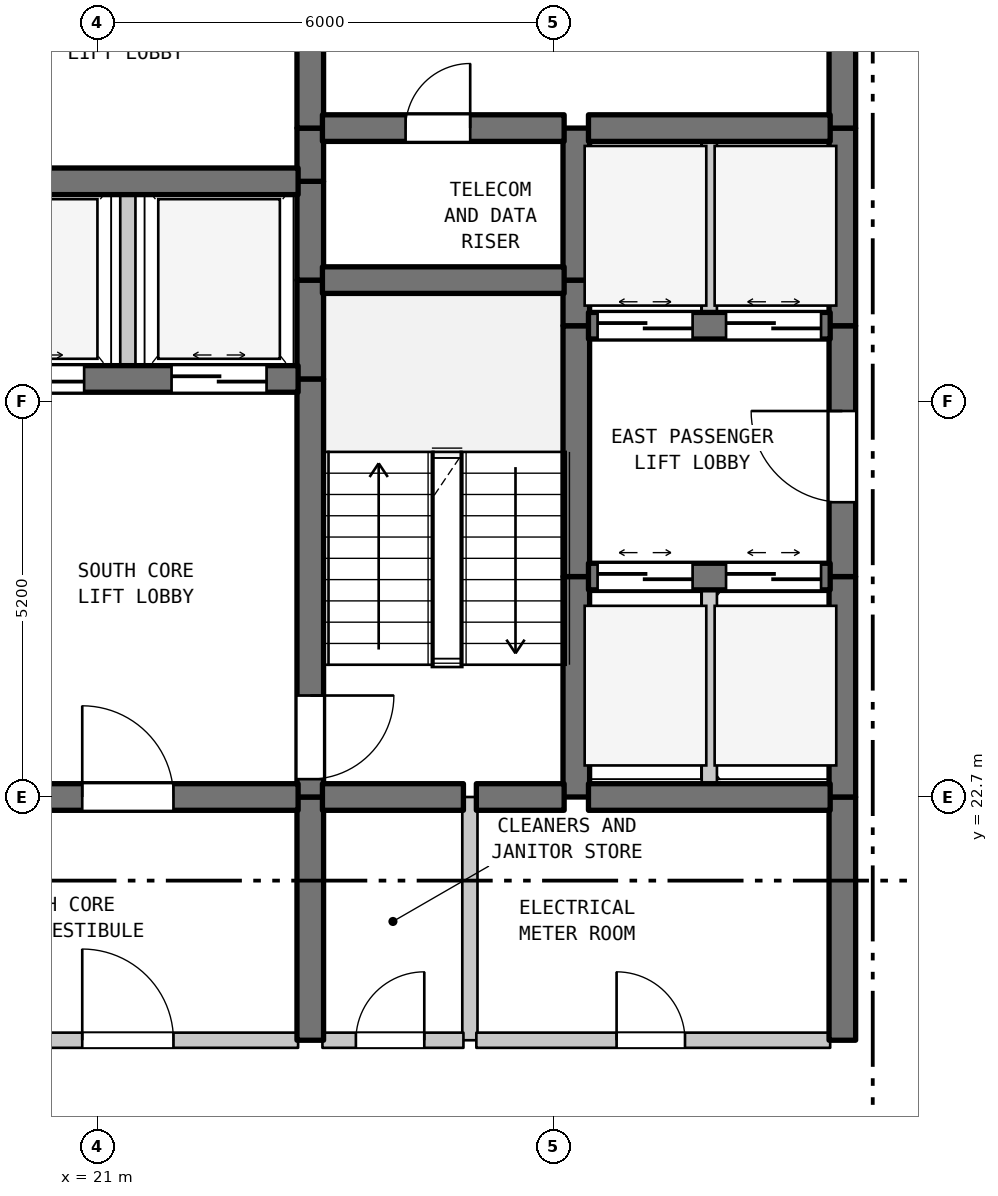
"""IFC4 building model, lengths in metres.
Left out: names, types, materials, properties, quantities, classifications, styles, units other than length and angle.
Written with IfcOpenShell. Run it as: python <this file> out.ifc"""

import sys

from ifc_helpers import new_model, si_unit, direction, frame, frame_2d, origin, place, context, subcontext, project, spatial, rectangle, extrude, element, fill, save


model = new_model("IFC4")
c1 = context("Model", 3, precision=1e-05, world=origin(), true_north=direction((0.0, 1.0)))
c2 = subcontext(c1, "Body", "Model", "MODEL_VIEW")
j1 = project(units=[si_unit("LENGTHUNIT", "METRE"), si_unit("PLANEANGLEUNIT", "RADIAN")], contexts=[c1])
p1 = place(None, origin())
s1 = spatial("IfcSite", under=j1, at=p1, CompositionType="ELEMENT")
p2 = place(p1, origin())
s2 = spatial("IfcBuilding", under=s1, at=p2, CompositionType="ELEMENT")
p3 = place(p2, frame((0.0, 0.0, 176.5)))
s3 = spatial("IfcBuildingStorey", under=s2, at=p3, CompositionType="ELEMENT", Elevation=176.5)
p4 = place(p3, frame((21.4, 28.2, 0.0), z_axis=(0.0, 0.0, 1.0), x_axis=(0.0, 1.0, 0.0)))
e1 = element("IfcWall", 1, at=p4, inside=s3, PredefinedType="STANDARD", context=c2, shape_type="SweptSolid", body=[
    extrude(rectangle(XDim=2.6, YDim=0.2, at=frame_2d((1.3, 0.0))), origin(), (0.0, 0.0, 1.0), 3.39),
])
p5 = place(p3, frame((23.8, 19.5, 0.0), z_axis=(0.0, 0.0, 1.0), x_axis=(0.0, 1.0, 0.0)))
e2 = element("IfcWall", 2, at=p5, inside=s3, PredefinedType="SHEAR", context=c2, shape_type="SweptSolid", body=[
    extrude(rectangle(XDim=3.2, YDim=0.35, at=frame_2d((1.6, 0.0))), origin(), (0.0, 0.0, 1.0), 3.39),
])
p6 = place(p3, frame((23.8, 22.7, 0.0), z_axis=(0.0, 0.0, 1.0), x_axis=(0.0, 1.0, 0.0)))
e3 = element("IfcWall", 3, at=p6, inside=s3, PredefinedType="SHEAR", context=c2, shape_type="SweptSolid", body=[
    extrude(rectangle(XDim=5.5, YDim=0.35, at=frame_2d((2.75, 0.0))), origin(), (0.0, 0.0, 1.0), 3.39),
])
p7 = place(p6, frame((0.235, 0.0, 0.0)))
e4 = element("IfcOpeningElement", 4, at=p7, cuts=e3, PredefinedType="OPENING", context=c2, shape_type="SweptSolid", body=[
    extrude(rectangle(XDim=1.1, YDim=2.15, at=frame_2d((0.55, 1.075))), frame((0.0, 0.185, 0.0), z_axis=(0.0, -1.0, 0.0), x_axis=(1.0, 0.0, 0.0)), (0.0, 0.0, 1.0), 0.37),
])
for number, where, z_axis, x_axis in (
    (5, (23.8, 28.2, 0.0), (0.0, 0.0, 1.0), (0.0, 1.0, 0.0)),
    (6, (23.8, 29.5, 0.0), (0.0, 0.0, 1.0), (0.0, 1.0, 0.0)),
):
    element("IfcWall", number, at=place(p3, frame(where, z_axis=z_axis, x_axis=x_axis)), inside=s3, PredefinedType="SHEAR", context=c2, shape_type="SweptSolid", body=[
        extrude(rectangle(XDim=1.3, YDim=0.35, at=frame_2d((0.65, 0.0))), origin(), (0.0, 0.0, 1.0), 3.39),
    ])
p8 = place(p3, frame((23.8, 30.8, 0.0), z_axis=(0.0, 0.0, 1.0), x_axis=(0.0, 1.0, 0.0)))
e7 = element("IfcWall", 7, at=p8, inside=s3, PredefinedType="SHEAR", context=c2, shape_type="SweptSolid", body=[
    extrude(rectangle(XDim=0.7, YDim=0.35, at=frame_2d((0.35, 0.0))), origin(), (0.0, 0.0, 1.0), 3.39),
])
p9 = place(p3, frame((23.8, 31.5, 0.0), z_axis=(0.0, 0.0, 1.0), x_axis=(0.0, 1.0, 0.0)))
e8 = element("IfcWall", 8, at=p9, inside=s3, PredefinedType="SHEAR", context=c2, shape_type="SweptSolid", body=[
    extrude(rectangle(XDim=3.5, YDim=0.35, at=frame_2d((1.75, 0.0))), origin(), (0.0, 0.0, 1.0), 3.39),
])
p10 = place(p9, frame((1.127, 0.0, 0.0)))
e9 = element("IfcOpeningElement", 9, at=p10, cuts=e8, PredefinedType="OPENING", context=c2, shape_type="SweptSolid", body=[
    extrude(rectangle(XDim=1.1, YDim=2.15, at=frame_2d((0.55, 1.075))), frame((0.0, 0.185, 0.0), z_axis=(0.0, -1.0, 0.0), x_axis=(1.0, 0.0, 0.0)), (0.0, 0.0, 1.0), 0.37),
])
p11 = place(p3, frame((25.9, 19.5, 0.0), z_axis=(0.0, 0.0, 1.0), x_axis=(0.0, 1.0, 0.0)))
e10 = element("IfcWall", 10, at=p11, inside=s3, PredefinedType="STANDARD", context=c2, shape_type="SweptSolid", body=[
    extrude(rectangle(XDim=3.2, YDim=0.2, at=frame_2d((1.6, 0.0))), origin(), (0.0, 0.0, 1.0), 3.39),
])
p12 = place(p3, frame((27.3, 22.7, 0.0), z_axis=(0.0, 0.0, 1.0), x_axis=(0.0, 1.0, 0.0)))
e11 = element("IfcWall", 11, at=p12, inside=s3, PredefinedType="SHEAR", context=c2, shape_type="SweptSolid", body=[
    extrude(rectangle(XDim=2.9, YDim=0.35, at=frame_2d((1.45, 0.0))), origin(), (0.0, 0.0, 1.0), 3.39),
])
p13 = place(p3, frame((27.3, 25.6, 0.0), z_axis=(0.0, 0.0, 1.0), x_axis=(0.0, 1.0, 0.0)))
e12 = element("IfcWall", 12, at=p13, inside=s3, PredefinedType="SHEAR", context=c2, shape_type="SweptSolid", body=[
    extrude(rectangle(XDim=3.3, YDim=0.35, at=frame_2d((1.65, 0.0))), origin(), (0.0, 0.0, 1.0), 3.39),
])
p14 = place(p3, frame((27.3, 28.9, 0.0), z_axis=(0.0, 0.0, 1.0), x_axis=(0.0, 1.0, 0.0)))
e13 = element("IfcWall", 13, at=p14, inside=s3, PredefinedType="SHEAR", context=c2, shape_type="SweptSolid", body=[
    extrude(rectangle(XDim=0.6, YDim=0.35, at=frame_2d((0.3, 0.0))), origin(), (0.0, 0.0, 1.0), 3.39),
])
p15 = place(p3, frame((27.3, 29.5, 0.0), z_axis=(0.0, 0.0, 1.0), x_axis=(0.0, 1.0, 0.0)))
e14 = element("IfcWall", 14, at=p15, inside=s3, PredefinedType="SHEAR", context=c2, shape_type="SweptSolid", body=[
    extrude(rectangle(XDim=2.0, YDim=0.35, at=frame_2d((1.0, 0.0))), origin(), (0.0, 0.0, 1.0), 3.39),
])
p16 = place(p3, frame((29.05, 22.7, 0.0), z_axis=(0.0, 0.0, 1.0), x_axis=(0.0, 1.0, 0.0)))
e15 = element("IfcWall", 15, at=p16, inside=s3, PredefinedType="STANDARD", context=c2, shape_type="SweptSolid", body=[
    extrude(rectangle(XDim=2.9, YDim=0.2, at=frame_2d((1.45, 0.0))), origin(), (0.0, 0.0, 1.0), 3.39),
])
p17 = place(p3, frame((29.05, 28.9, 0.0), z_axis=(0.0, 0.0, 1.0), x_axis=(0.0, 1.0, 0.0)))
e16 = element("IfcWall", 16, at=p17, inside=s3, PredefinedType="STANDARD", context=c2, shape_type="SweptSolid", body=[
    extrude(rectangle(XDim=2.6, YDim=0.2, at=frame_2d((1.3, 0.0))), origin(), (0.0, 0.0, 1.0), 3.39),
])
p18 = place(p3, frame((30.8, 19.5, 0.0), z_axis=(0.0, 0.0, 1.0), x_axis=(0.0, 1.0, 0.0)))
e17 = element("IfcWall", 17, at=p18, inside=s3, PredefinedType="SHEAR", context=c2, shape_type="SweptSolid", body=[
    extrude(rectangle(XDim=3.2, YDim=0.35, at=frame_2d((1.6, 0.0))), origin(), (0.0, 0.0, 1.0), 3.39),
])
p19 = place(p3, frame((30.8, 22.7, 0.0), z_axis=(0.0, 0.0, 1.0), x_axis=(0.0, 1.0, 0.0)))
e18 = element("IfcWall", 18, at=p19, inside=s3, PredefinedType="SHEAR", context=c2, shape_type="SweptSolid", body=[
    extrude(rectangle(XDim=2.9, YDim=0.35, at=frame_2d((1.45, 0.0))), origin(), (0.0, 0.0, 1.0), 3.39),
])
p20 = place(p3, frame((30.8, 25.6, 0.0), z_axis=(0.0, 0.0, 1.0), x_axis=(0.0, 1.0, 0.0)))
e19 = element("IfcWall", 19, at=p20, inside=s3, PredefinedType="SHEAR", context=c2, shape_type="SweptSolid", body=[
    extrude(rectangle(XDim=3.3, YDim=0.35, at=frame_2d((1.65, 0.0))), origin(), (0.0, 0.0, 1.0), 3.39),
])
p21 = place(p20, frame((0.978, 0.0, 0.0)))
e20 = element("IfcOpeningElement", 20, at=p21, cuts=e19, PredefinedType="OPENING", context=c2, shape_type="SweptSolid", body=[
    extrude(rectangle(XDim=1.2, YDim=2.2, at=frame_2d((0.6, 1.1))), frame((0.0, 0.185, 0.0), z_axis=(0.0, -1.0, 0.0), x_axis=(1.0, 0.0, 0.0)), (0.0, 0.0, 1.0), 0.37),
])
p22 = place(p3, frame((30.8, 28.9, 0.0), z_axis=(0.0, 0.0, 1.0), x_axis=(0.0, 1.0, 0.0)))
e21 = element("IfcWall", 21, at=p22, inside=s3, PredefinedType="SHEAR", context=c2, shape_type="SweptSolid", body=[
    extrude(rectangle(XDim=2.6, YDim=0.35, at=frame_2d((1.3, 0.0))), origin(), (0.0, 0.0, 1.0), 3.39),
])
p23 = place(p3, frame((30.8, 31.5, 0.0), z_axis=(0.0, 0.0, 1.0), x_axis=(0.0, 1.0, 0.0)))
e22 = element("IfcWall", 22, at=p23, inside=s3, PredefinedType="SHEAR", context=c2, shape_type="SweptSolid", body=[
    extrude(rectangle(XDim=3.5, YDim=0.35, at=frame_2d((1.75, 0.0))), origin(), (0.0, 0.0, 1.0), 3.39),
])
p24 = place(p23, frame((1.15, 0.0, 0.0)))
e23 = element("IfcOpeningElement", 23, at=p24, cuts=e22, PredefinedType="OPENING", context=c2, shape_type="SweptSolid", body=[
    extrude(rectangle(XDim=1.2, YDim=2.2, at=frame_2d((0.6, 1.1))), frame((0.0, 0.185, 0.0), z_axis=(0.0, -1.0, 0.0), x_axis=(1.0, 0.0, 0.0)), (0.0, 0.0, 1.0), 0.37),
])
p25 = place(p3, frame((19.16, 19.5, 0.0), z_axis=(0.0, 0.0, 1.0), x_axis=(1.0, 0.0, 0.0)))
e24 = element("IfcWall", 24, at=p25, inside=s3, PredefinedType="STANDARD", context=c2, shape_type="SweptSolid", body=[
    extrude(rectangle(XDim=4.48, YDim=0.2, at=frame_2d((2.24, 0.0))), origin(), (0.0, 0.0, 1.0), 3.39),
])
p26 = place(p25, frame((1.64, 0.0, 0.0)))
e25 = element("IfcOpeningElement", 25, at=p26, cuts=e24, PredefinedType="OPENING", context=c2, shape_type="SweptSolid", body=[
    extrude(rectangle(XDim=1.2, YDim=2.2, at=frame_2d((0.6, 1.1))), frame((0.0, 0.11, 0.0), z_axis=(0.0, -1.0, 0.0), x_axis=(1.0, 0.0, 0.0)), (0.0, 0.0, 1.0), 0.22),
])
p27 = place(p3, frame((23.96, 19.5, 0.0), z_axis=(0.0, 0.0, 1.0), x_axis=(1.0, 0.0, 0.0)))
e26 = element("IfcWall", 26, at=p27, inside=s3, PredefinedType="STANDARD", context=c2, shape_type="SweptSolid", body=[
    extrude(rectangle(XDim=1.855, YDim=0.2, at=frame_2d((0.927, 0.0))), origin(), (0.0, 0.0, 1.0), 3.39),
])
p28 = place(p27, frame((0.44, 0.0, 0.0)))
e27 = element("IfcOpeningElement", 27, at=p28, cuts=e26, PredefinedType="OPENING", context=c2, shape_type="SweptSolid", body=[
    extrude(rectangle(XDim=0.9, YDim=2.15, at=frame_2d((0.45, 1.075))), frame((0.0, 0.11, 0.0), z_axis=(0.0, -1.0, 0.0), x_axis=(1.0, 0.0, 0.0)), (0.0, 0.0, 1.0), 0.22),
])
p29 = place(p3, frame((25.985, 19.5, 0.0), z_axis=(0.0, 0.0, 1.0), x_axis=(1.0, 0.0, 0.0)))
e28 = element("IfcWall", 28, at=p29, inside=s3, PredefinedType="STANDARD", context=c2, shape_type="SweptSolid", body=[
    extrude(rectangle(XDim=4.655, YDim=0.2, at=frame_2d((2.327, 0.0))), origin(), (0.0, 0.0, 1.0), 3.39),
])
p30 = place(p29, frame((1.845, 0.0, 0.0)))
e29 = element("IfcOpeningElement", 29, at=p30, cuts=e28, PredefinedType="OPENING", context=c2, shape_type="SweptSolid", body=[
    extrude(rectangle(XDim=0.9, YDim=2.15, at=frame_2d((0.45, 1.075))), frame((0.0, 0.11, 0.0), z_axis=(0.0, -1.0, 0.0), x_axis=(1.0, 0.0, 0.0)), (0.0, 0.0, 1.0), 0.22),
])
p31 = place(p3, frame((19.16, 22.7, 0.0), z_axis=(0.0, 0.0, 1.0), x_axis=(1.0, 0.0, 0.0)))
e30 = element("IfcWall", 30, at=p31, inside=s3, PredefinedType="SHEAR", context=c2, shape_type="SweptSolid", body=[
    extrude(rectangle(XDim=4.48, YDim=0.35, at=frame_2d((2.24, 0.0))), origin(), (0.0, 0.0, 1.0), 3.39),
])
p32 = place(p31, frame((1.64, 0.0, 0.0)))
e31 = element("IfcOpeningElement", 31, at=p32, cuts=e30, PredefinedType="OPENING", context=c2, shape_type="SweptSolid", body=[
    extrude(rectangle(XDim=1.2, YDim=2.2, at=frame_2d((0.6, 1.1))), frame((0.0, 0.185, 0.0), z_axis=(0.0, -1.0, 0.0), x_axis=(1.0, 0.0, 0.0)), (0.0, 0.0, 1.0), 0.37),
])
p33 = place(p3, frame((23.96, 22.7, 0.0), z_axis=(0.0, 0.0, 1.0), x_axis=(1.0, 0.0, 0.0)))
e32 = element("IfcWall", 32, at=p33, inside=s3, PredefinedType="SHEAR", context=c2, shape_type="SweptSolid", body=[
    extrude(rectangle(XDim=1.855, YDim=0.35, at=frame_2d((0.927, 0.0))), origin(), (0.0, 0.0, 1.0), 3.39),
])
p34 = place(p3, frame((25.985, 22.7, 0.0), z_axis=(0.0, 0.0, 1.0), x_axis=(1.0, 0.0, 0.0)))
e33 = element("IfcWall", 33, at=p34, inside=s3, PredefinedType="SHEAR", context=c2, shape_type="SweptSolid", body=[
    extrude(rectangle(XDim=1.155, YDim=0.35, at=frame_2d((0.577, 0.0))), origin(), (0.0, 0.0, 1.0), 3.39),
])
p35 = place(p3, frame((27.46, 22.7, 0.0), z_axis=(0.0, 0.0, 1.0), x_axis=(1.0, 0.0, 0.0)))
e34 = element("IfcWall", 34, at=p35, inside=s3, PredefinedType="SHEAR", context=c2, shape_type="SweptSolid", body=[
    extrude(rectangle(XDim=3.18, YDim=0.35, at=frame_2d((1.59, 0.0))), origin(), (0.0, 0.0, 1.0), 3.39),
])
p36 = place(p3, frame((27.46, 25.6, 0.0), z_axis=(0.0, 0.0, 1.0), x_axis=(1.0, 0.0, 0.0)))
e35 = element("IfcWall", 35, at=p36, inside=s3, PredefinedType="SHEAR", context=c2, shape_type="SweptSolid", body=[
    extrude(rectangle(XDim=3.18, YDim=0.35, at=frame_2d((1.59, 0.0))), origin(), (0.0, 0.0, 1.0), 3.39),
])
p37 = place(p36, frame((0.12, 0.0, 0.0)))
e36 = element("IfcOpeningElement", 36, at=p37, cuts=e35, PredefinedType="OPENING", context=c2, shape_type="SweptSolid", body=[
    extrude(rectangle(XDim=1.25, YDim=2.2, at=frame_2d((0.625, 1.1))), frame((0.0, 0.185, 0.0), z_axis=(0.0, -1.0, 0.0), x_axis=(1.0, 0.0, 0.0)), (0.0, 0.0, 1.0), 0.37),
])
p38 = place(p36, frame((1.81, 0.0, 0.0)))
e37 = element("IfcOpeningElement", 37, at=p38, cuts=e35, PredefinedType="OPENING", context=c2, shape_type="SweptSolid", body=[
    extrude(rectangle(XDim=1.25, YDim=2.2, at=frame_2d((0.625, 1.1))), frame((0.0, 0.185, 0.0), z_axis=(0.0, -1.0, 0.0), x_axis=(1.0, 0.0, 0.0)), (0.0, 0.0, 1.0), 0.37),
])
p39 = place(p3, frame((19.16, 28.2, 0.0), z_axis=(0.0, 0.0, 1.0), x_axis=(1.0, 0.0, 0.0)))
e38 = element("IfcWall", 38, at=p39, inside=s3, PredefinedType="SHEAR", context=c2, shape_type="SweptSolid", body=[
    extrude(rectangle(XDim=4.48, YDim=0.35, at=frame_2d((2.24, 0.0))), origin(), (0.0, 0.0, 1.0), 3.39),
])
p40 = place(p39, frame((0.415, 0.0, 0.0)))
e39 = element("IfcOpeningElement", 39, at=p40, cuts=e38, PredefinedType="OPENING", context=c2, shape_type="SweptSolid", body=[
    extrude(rectangle(XDim=1.25, YDim=2.2, at=frame_2d((0.625, 1.1))), frame((0.0, 0.185, 0.0), z_axis=(0.0, -1.0, 0.0), x_axis=(1.0, 0.0, 0.0)), (0.0, 0.0, 1.0), 0.37),
])
p41 = place(p39, frame((2.815, 0.0, 0.0)))
e40 = element("IfcOpeningElement", 40, at=p41, cuts=e38, PredefinedType="OPENING", context=c2, shape_type="SweptSolid", body=[
    extrude(rectangle(XDim=1.25, YDim=2.2, at=frame_2d((0.625, 1.1))), frame((0.0, 0.185, 0.0), z_axis=(0.0, -1.0, 0.0), x_axis=(1.0, 0.0, 0.0)), (0.0, 0.0, 1.0), 0.37),
])
p42 = place(p3, frame((27.46, 28.9, 0.0), z_axis=(0.0, 0.0, 1.0), x_axis=(1.0, 0.0, 0.0)))
e41 = element("IfcWall", 41, at=p42, inside=s3, PredefinedType="SHEAR", context=c2, shape_type="SweptSolid", body=[
    extrude(rectangle(XDim=3.18, YDim=0.35, at=frame_2d((1.59, 0.0))), origin(), (0.0, 0.0, 1.0), 3.39),
])
p43 = place(p42, frame((0.12, 0.0, 0.0)))
e42 = element("IfcOpeningElement", 42, at=p43, cuts=e41, PredefinedType="OPENING", context=c2, shape_type="SweptSolid", body=[
    extrude(rectangle(XDim=1.25, YDim=2.2, at=frame_2d((0.625, 1.1))), frame((0.0, 0.185, 0.0), z_axis=(0.0, -1.0, 0.0), x_axis=(1.0, 0.0, 0.0)), (0.0, 0.0, 1.0), 0.37),
])
p44 = place(p42, frame((1.81, 0.0, 0.0)))
e43 = element("IfcOpeningElement", 43, at=p44, cuts=e41, PredefinedType="OPENING", context=c2, shape_type="SweptSolid", body=[
    extrude(rectangle(XDim=1.25, YDim=2.2, at=frame_2d((0.625, 1.1))), frame((0.0, 0.185, 0.0), z_axis=(0.0, -1.0, 0.0), x_axis=(1.0, 0.0, 0.0)), (0.0, 0.0, 1.0), 0.37),
])
p45 = place(p3, frame((23.96, 29.5, 0.0), z_axis=(0.0, 0.0, 1.0), x_axis=(1.0, 0.0, 0.0)))
e44 = element("IfcWall", 44, at=p45, inside=s3, PredefinedType="SHEAR", context=c2, shape_type="SweptSolid", body=[
    extrude(rectangle(XDim=3.18, YDim=0.35, at=frame_2d((1.59, 0.0))), origin(), (0.0, 0.0, 1.0), 3.39),
])
p46 = place(p3, frame((19.16, 30.8, 0.0), z_axis=(0.0, 0.0, 1.0), x_axis=(1.0, 0.0, 0.0)))
e45 = element("IfcWall", 45, at=p46, inside=s3, PredefinedType="SHEAR", context=c2, shape_type="SweptSolid", body=[
    extrude(rectangle(XDim=4.48, YDim=0.35, at=frame_2d((2.24, 0.0))), origin(), (0.0, 0.0, 1.0), 3.39),
])
p47 = place(p3, frame((23.96, 31.5, 0.0), z_axis=(0.0, 0.0, 1.0), x_axis=(1.0, 0.0, 0.0)))
e46 = element("IfcWall", 46, at=p47, inside=s3, PredefinedType="SHEAR", context=c2, shape_type="SweptSolid", body=[
    extrude(rectangle(XDim=3.18, YDim=0.35, at=frame_2d((1.59, 0.0))), origin(), (0.0, 0.0, 1.0), 3.39),
])
p48 = place(p47, frame((1.094, 0.0, 0.0)))
e47 = element("IfcOpeningElement", 47, at=p48, cuts=e46, PredefinedType="OPENING", context=c2, shape_type="SweptSolid", body=[
    extrude(rectangle(XDim=0.85, YDim=2.1, at=frame_2d((0.425, 1.05))), frame((0.0, 0.185, 0.0), z_axis=(0.0, -1.0, 0.0), x_axis=(1.0, 0.0, 0.0)), (0.0, 0.0, 1.0), 0.37),
])
p49 = place(p3, frame((27.46, 31.5, 0.0), z_axis=(0.0, 0.0, 1.0), x_axis=(1.0, 0.0, 0.0)))
e48 = element("IfcWall", 48, at=p49, inside=s3, PredefinedType="SHEAR", context=c2, shape_type="SweptSolid", body=[
    extrude(rectangle(XDim=3.18, YDim=0.35, at=frame_2d((1.59, 0.0))), origin(), (0.0, 0.0, 1.0), 3.39),
])
p50 = place(p7, frame((1.1, 0.0, 0.0), z_axis=(0.0, 0.0, 1.0), x_axis=(-1.0, 0.0, 0.0)))
e49 = element("IfcDoor", 49, at=p50, inside=s3, OperationType="SINGLE_SWING_RIGHT", PredefinedType="DOOR", context=c2, shape_type="SweptSolid", body=[
    extrude(rectangle(XDim=1.1, YDim=2.15, at=frame_2d((0.55, 1.075))), frame((0.0, 0.025, 0.0), z_axis=(0.0, -1.0, 0.0), x_axis=(1.0, 0.0, 0.0)), (0.0, 0.0, 1.0), 0.05),
])
fill(e4, e49)
p51 = place(p21, origin())
e50 = element("IfcDoor", 50, at=p51, inside=s3, OperationType="SINGLE_SWING_RIGHT", PredefinedType="DOOR", context=c2, shape_type="SweptSolid", body=[
    extrude(rectangle(XDim=1.2, YDim=2.2, at=frame_2d((0.6, 1.1))), frame((0.0, 0.025, 0.0), z_axis=(0.0, -1.0, 0.0), x_axis=(1.0, 0.0, 0.0)), (0.0, 0.0, 1.0), 0.05),
])
fill(e20, e50)
p52 = place(p26, origin())
e51 = element("IfcDoor", 51, at=p52, inside=s3, OperationType="SINGLE_SWING_LEFT", PredefinedType="DOOR", context=c2, shape_type="SweptSolid", body=[
    extrude(rectangle(XDim=1.2, YDim=2.2, at=frame_2d((0.6, 1.1))), frame((0.0, 0.025, 0.0), z_axis=(0.0, -1.0, 0.0), x_axis=(1.0, 0.0, 0.0)), (0.0, 0.0, 1.0), 0.05),
])
fill(e25, e51)
p53 = place(p28, origin())
e52 = element("IfcDoor", 52, at=p53, inside=s3, OperationType="SINGLE_SWING_RIGHT", PredefinedType="DOOR", context=c2, shape_type="SweptSolid", body=[
    extrude(rectangle(XDim=0.9, YDim=2.15, at=frame_2d((0.45, 1.075))), frame((0.0, 0.025, 0.0), z_axis=(0.0, -1.0, 0.0), x_axis=(1.0, 0.0, 0.0)), (0.0, 0.0, 1.0), 0.05),
])
fill(e27, e52)
p54 = place(p30, origin())
e53 = element("IfcDoor", 53, at=p54, inside=s3, OperationType="SINGLE_SWING_LEFT", PredefinedType="DOOR", context=c2, shape_type="SweptSolid", body=[
    extrude(rectangle(XDim=0.9, YDim=2.15, at=frame_2d((0.45, 1.075))), frame((0.0, 0.025, 0.0), z_axis=(0.0, -1.0, 0.0), x_axis=(1.0, 0.0, 0.0)), (0.0, 0.0, 1.0), 0.05),
])
fill(e29, e53)
p55 = place(p32, origin())
e54 = element("IfcDoor", 54, at=p55, inside=s3, OperationType="SINGLE_SWING_LEFT", PredefinedType="DOOR", context=c2, shape_type="SweptSolid", body=[
    extrude(rectangle(XDim=1.2, YDim=2.2, at=frame_2d((0.6, 1.1))), frame((0.0, 0.025, 0.0), z_axis=(0.0, -1.0, 0.0), x_axis=(1.0, 0.0, 0.0)), (0.0, 0.0, 1.0), 0.05),
])
fill(e31, e54)
p56 = place(p37, origin())
e55 = element("IfcDoor", 55, at=p56, inside=s3, OperationType="DOUBLE_DOOR_SLIDING", PredefinedType="DOOR", context=c2, shape_type="SweptSolid", body=[
    extrude(rectangle(XDim=1.25, YDim=2.2, at=frame_2d((0.625, 1.1))), frame((0.0, 0.025, 0.0), z_axis=(0.0, -1.0, 0.0), x_axis=(1.0, 0.0, 0.0)), (0.0, 0.0, 1.0), 0.05),
])
fill(e36, e55)
p57 = place(p38, origin())
e56 = element("IfcDoor", 56, at=p57, inside=s3, OperationType="DOUBLE_DOOR_SLIDING", PredefinedType="DOOR", context=c2, shape_type="SweptSolid", body=[
    extrude(rectangle(XDim=1.25, YDim=2.2, at=frame_2d((0.625, 1.1))), frame((0.0, 0.025, 0.0), z_axis=(0.0, -1.0, 0.0), x_axis=(1.0, 0.0, 0.0)), (0.0, 0.0, 1.0), 0.05),
])
fill(e37, e56)
p58 = place(p40, origin())
e57 = element("IfcDoor", 57, at=p58, inside=s3, OperationType="DOUBLE_DOOR_SLIDING", PredefinedType="DOOR", context=c2, shape_type="SweptSolid", body=[
    extrude(rectangle(XDim=1.25, YDim=2.2, at=frame_2d((0.625, 1.1))), frame((0.0, 0.025, 0.0), z_axis=(0.0, -1.0, 0.0), x_axis=(1.0, 0.0, 0.0)), (0.0, 0.0, 1.0), 0.05),
])
fill(e39, e57)
p59 = place(p41, origin())
e58 = element("IfcDoor", 58, at=p59, inside=s3, OperationType="DOUBLE_DOOR_SLIDING", PredefinedType="DOOR", context=c2, shape_type="SweptSolid", body=[
    extrude(rectangle(XDim=1.25, YDim=2.2, at=frame_2d((0.625, 1.1))), frame((0.0, 0.025, 0.0), z_axis=(0.0, -1.0, 0.0), x_axis=(1.0, 0.0, 0.0)), (0.0, 0.0, 1.0), 0.05),
])
fill(e40, e58)
p60 = place(p43, origin())
e59 = element("IfcDoor", 59, at=p60, inside=s3, OperationType="DOUBLE_DOOR_SLIDING", PredefinedType="DOOR", context=c2, shape_type="SweptSolid", body=[
    extrude(rectangle(XDim=1.25, YDim=2.2, at=frame_2d((0.625, 1.1))), frame((0.0, 0.025, 0.0), z_axis=(0.0, -1.0, 0.0), x_axis=(1.0, 0.0, 0.0)), (0.0, 0.0, 1.0), 0.05),
])
fill(e42, e59)
p61 = place(p44, origin())
e60 = element("IfcDoor", 60, at=p61, inside=s3, OperationType="DOUBLE_DOOR_SLIDING", PredefinedType="DOOR", context=c2, shape_type="SweptSolid", body=[
    extrude(rectangle(XDim=1.25, YDim=2.2, at=frame_2d((0.625, 1.1))), frame((0.0, 0.025, 0.0), z_axis=(0.0, -1.0, 0.0), x_axis=(1.0, 0.0, 0.0)), (0.0, 0.0, 1.0), 0.05),
])
fill(e43, e60)
p62 = place(p48, origin())
e61 = element("IfcDoor", 61, at=p62, inside=s3, OperationType="SINGLE_SWING_RIGHT", PredefinedType="DOOR", context=c2, shape_type="SweptSolid", body=[
    extrude(rectangle(XDim=0.85, YDim=2.1, at=frame_2d((0.425, 1.05))), frame((0.0, 0.025, 0.0), z_axis=(0.0, -1.0, 0.0), x_axis=(1.0, 0.0, 0.0)), (0.0, 0.0, 1.0), 0.05),
])
fill(e47, e61)
save(model, sys.argv[1])
